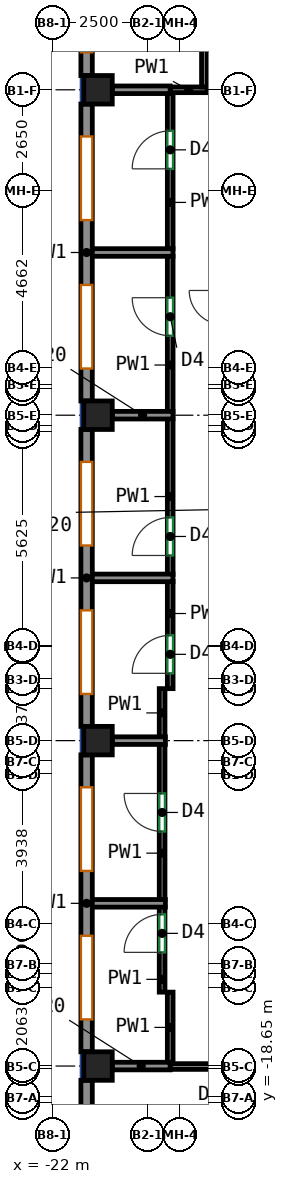
"""IFC4 building model, lengths in metres.
Left out: names, types, materials, properties, quantities, classifications, styles, units other than length and angle.
Written with IfcOpenShell. Run it as: python <this file> out.ifc"""

import sys

from ifc_helpers import new_model, si_unit, direction, frame, frame_2d, origin, origin_2d, place, context, subcontext, project, spatial, rectangle, extrude, source, transform, mapped, element, fill, save


model = new_model("IFC4")
c1 = context("Model", 3, precision=1e-05, world=origin(), true_north=direction((0.0, 1.0)))
c2 = subcontext(c1, "Body", "Model", "MODEL_VIEW")
j1 = project(units=[si_unit("LENGTHUNIT", "METRE"), si_unit("PLANEANGLEUNIT", "RADIAN")], contexts=[c1])
p1 = place(None, origin())
s1 = spatial("IfcSite", under=j1, at=p1, CompositionType="ELEMENT")
p2 = place(p1, origin())
s2 = spatial("IfcBuilding", under=s1, at=p2, CompositionType="ELEMENT")
p3 = place(p2, frame((0.0, 0.0, 203.3)))
s3 = spatial("IfcBuildingStorey", under=s2, at=p3, CompositionType="ELEMENT", Elevation=203.3)
m1 = source(origin(), c2, "Body", "SweptSolid", [
    extrude(rectangle(XDim=0.75, YDim=0.75, at=origin_2d()), origin(), (0.0, 0.0, 1.0), 3.12),
])
for number, where, z_axis, x_axis in (
    (1, (-20.8, -17.688, 0.0), (0.0, 0.0, 1.0), (1.0, 0.0, 0.0)),
    (2, (-20.8, -9.125, 0.0), (0.0, 0.0, 1.0), (1.0, 0.0, 0.0)),
    (3, (-20.8, -0.562, 0.0), (0.0, 0.0, 1.0), (1.0, 0.0, 0.0)),
    (4, (-20.8, 8.0, 0.0), (0.0, 0.0, 1.0), (1.0, 0.0, 0.0)),
):
    element("IfcColumn", number, at=place(p3, frame(where, z_axis=z_axis, x_axis=x_axis)), inside=s3, PredefinedType="COLUMN", context=c2, shape_type="MappedRepresentation", body=[
        mapped(m1, transform((0.0, 0.0, 0.0))),
    ])
m2 = source(origin(), c2, "Body", "SweptSolid", [
    extrude(rectangle(XDim=13.682, YDim=0.3, at=frame_2d((6.841, 0.0))), origin(), (0.0, 0.0, 1.0), 3.12),
])
p4 = place(p3, frame((-21.1, 22.057, 0.0), z_axis=(0.0, 0.0, 1.0), x_axis=(0.0, -1.0, 0.0)))
e5 = element("IfcWall", 5, at=p4, inside=s3, PredefinedType="SOLIDWALL", context=c2, shape_type="MappedRepresentation", body=[
    mapped(m2, transform((0.0, 0.0, 0.0))),
])
p5 = place(p4, frame((0.61, 0.0, 0.85)))
e6 = element("IfcOpeningElement", 6, at=p5, cuts=e5, PredefinedType="OPENING", context=c2, shape_type="SweptSolid", body=[
    extrude(rectangle(XDim=2.2, YDim=1.95, at=frame_2d((1.1, 0.975))), frame((0.0, 0.16, 0.0), z_axis=(0.0, -1.0, 0.0), x_axis=(1.0, 0.0, 0.0)), (0.0, 0.0, 1.0), 0.32),
])
p6 = place(p4, frame((4.031, 0.0, 0.85)))
e7 = element("IfcOpeningElement", 7, at=p6, cuts=e5, PredefinedType="OPENING", context=c2, shape_type="SweptSolid", body=[
    extrude(rectangle(XDim=2.2, YDim=1.95, at=frame_2d((1.1, 0.975))), frame((0.0, 0.16, 0.0), z_axis=(0.0, -1.0, 0.0), x_axis=(1.0, 0.0, 0.0)), (0.0, 0.0, 1.0), 0.32),
])
p7 = place(p4, frame((7.451, 0.0, 0.85)))
e8 = element("IfcOpeningElement", 8, at=p7, cuts=e5, PredefinedType="OPENING", context=c2, shape_type="SweptSolid", body=[
    extrude(rectangle(XDim=2.2, YDim=1.95, at=frame_2d((1.1, 0.975))), frame((0.0, 0.16, 0.0), z_axis=(0.0, -1.0, 0.0), x_axis=(1.0, 0.0, 0.0)), (0.0, 0.0, 1.0), 0.32),
])
p8 = place(p4, frame((10.872, 0.0, 0.85)))
e9 = element("IfcOpeningElement", 9, at=p8, cuts=e5, PredefinedType="OPENING", context=c2, shape_type="SweptSolid", body=[
    extrude(rectangle(XDim=2.2, YDim=1.95, at=frame_2d((1.1, 0.975))), frame((0.0, 0.16, 0.0), z_axis=(0.0, -1.0, 0.0), x_axis=(1.0, 0.0, 0.0)), (0.0, 0.0, 1.0), 0.32),
])
m3 = source(origin(), c2, "Body", "SweptSolid", [
    extrude(rectangle(XDim=7.812, YDim=0.3, at=frame_2d((3.906, 0.0))), origin(), (0.0, 0.0, 1.0), 3.12),
])
p9 = place(p3, frame((-21.1, 7.625, 0.0), z_axis=(0.0, 0.0, 1.0), x_axis=(0.0, -1.0, 0.0)))
e10 = element("IfcWall", 10, at=p9, inside=s3, PredefinedType="SOLIDWALL", context=c2, shape_type="MappedRepresentation", body=[
    mapped(m3, transform((0.0, 0.0, 0.0))),
])
p10 = place(p9, frame((0.853, 0.0, 0.85)))
e11 = element("IfcOpeningElement", 11, at=p10, cuts=e10, PredefinedType="OPENING", context=c2, shape_type="SweptSolid", body=[
    extrude(rectangle(XDim=2.2, YDim=1.95, at=frame_2d((1.1, 0.975))), frame((0.0, 0.16, 0.0), z_axis=(0.0, -1.0, 0.0), x_axis=(1.0, 0.0, 0.0)), (0.0, 0.0, 1.0), 0.32),
])
p11 = place(p9, frame((4.759, 0.0, 0.85)))
e12 = element("IfcOpeningElement", 12, at=p11, cuts=e10, PredefinedType="OPENING", context=c2, shape_type="SweptSolid", body=[
    extrude(rectangle(XDim=2.2, YDim=1.95, at=frame_2d((1.1, 0.975))), frame((0.0, 0.16, 0.0), z_axis=(0.0, -1.0, 0.0), x_axis=(1.0, 0.0, 0.0)), (0.0, 0.0, 1.0), 0.32),
])
p12 = place(p3, frame((-21.1, -0.938, 0.0), z_axis=(0.0, 0.0, 1.0), x_axis=(0.0, -1.0, 0.0)))
e13 = element("IfcWall", 13, at=p12, inside=s3, PredefinedType="SOLIDWALL", context=c2, shape_type="MappedRepresentation", body=[
    mapped(m3, transform((0.0, 0.0, 0.0))),
])
p13 = place(p12, frame((0.853, 0.0, 0.85)))
e14 = element("IfcOpeningElement", 14, at=p13, cuts=e13, PredefinedType="OPENING", context=c2, shape_type="SweptSolid", body=[
    extrude(rectangle(XDim=2.2, YDim=1.95, at=frame_2d((1.1, 0.975))), frame((0.0, 0.16, 0.0), z_axis=(0.0, -1.0, 0.0), x_axis=(1.0, 0.0, 0.0)), (0.0, 0.0, 1.0), 0.32),
])
p14 = place(p12, frame((4.76, 0.0, 0.85)))
e15 = element("IfcOpeningElement", 15, at=p14, cuts=e13, PredefinedType="OPENING", context=c2, shape_type="SweptSolid", body=[
    extrude(rectangle(XDim=2.2, YDim=1.95, at=frame_2d((1.1, 0.975))), frame((0.0, 0.16, 0.0), z_axis=(0.0, -1.0, 0.0), x_axis=(1.0, 0.0, 0.0)), (0.0, 0.0, 1.0), 0.32),
])
p15 = place(p3, frame((-21.1, -9.5, 0.0), z_axis=(0.0, 0.0, 1.0), x_axis=(0.0, -1.0, 0.0)))
e16 = element("IfcWall", 16, at=p15, inside=s3, PredefinedType="SOLIDWALL", context=c2, shape_type="MappedRepresentation", body=[
    mapped(m3, transform((0.0, 0.0, 0.0))),
])
p16 = place(p15, frame((0.853, 0.0, 0.85)))
e17 = element("IfcOpeningElement", 17, at=p16, cuts=e16, PredefinedType="OPENING", context=c2, shape_type="SweptSolid", body=[
    extrude(rectangle(XDim=2.2, YDim=1.95, at=frame_2d((1.1, 0.975))), frame((0.0, 0.16, 0.0), z_axis=(0.0, -1.0, 0.0), x_axis=(1.0, 0.0, 0.0)), (0.0, 0.0, 1.0), 0.32),
])
p17 = place(p15, frame((4.759, 0.0, 0.85)))
e18 = element("IfcOpeningElement", 18, at=p17, cuts=e16, PredefinedType="OPENING", context=c2, shape_type="SweptSolid", body=[
    extrude(rectangle(XDim=2.2, YDim=1.95, at=frame_2d((1.1, 0.975))), frame((0.0, 0.16, 0.0), z_axis=(0.0, -1.0, 0.0), x_axis=(1.0, 0.0, 0.0)), (0.0, 0.0, 1.0), 0.32),
])
m4 = source(origin(), c2, "Body", "SweptSolid", [
    extrude(rectangle(XDim=4.312, YDim=0.3, at=frame_2d((2.156, 0.0))), origin(), (0.0, 0.0, 1.0), 3.12),
])
p18 = place(p3, frame((-21.1, -18.062, 0.0), z_axis=(0.0, 0.0, 1.0), x_axis=(0.0, -1.0, 0.0)))
e19 = element("IfcWall", 19, at=p18, inside=s3, PredefinedType="SOLIDWALL", context=c2, shape_type="MappedRepresentation", body=[
    mapped(m4, transform((0.0, 0.0, 0.0))),
])
p19 = place(p18, frame((1.056, 0.0, 0.85)))
e20 = element("IfcOpeningElement", 20, at=p19, cuts=e19, PredefinedType="OPENING", context=c2, shape_type="SweptSolid", body=[
    extrude(rectangle(XDim=2.2, YDim=1.95, at=frame_2d((1.1, 0.975))), frame((0.0, 0.16, 0.0), z_axis=(0.0, -1.0, 0.0), x_axis=(1.0, 0.0, 0.0)), (0.0, 0.0, 1.0), 0.32),
])
p20 = place(p3, frame((-18.9, -17.7, 0.0), z_axis=(0.0, 0.0, 1.0), x_axis=(1.0, 0.0, 0.0)))
e21 = element("IfcWall", 21, at=p20, inside=s3, PredefinedType="PARTITIONING", context=c2, shape_type="SweptSolid", body=[
    extrude(rectangle(XDim=8.233, YDim=0.15, at=frame_2d((4.116, 0.0))), origin(), (0.0, 0.0, 1.0), 2.52),
])
p21 = place(p20, frame((1.135, 0.0, 0.0)))
e22 = element("IfcOpeningElement", 22, at=p21, cuts=e21, PredefinedType="OPENING", context=c2, shape_type="SweptSolid", body=[
    extrude(rectangle(XDim=1.0, YDim=2.1, at=frame_2d((0.5, 1.05))), frame((0.0, 0.085, 0.0), z_axis=(0.0, -1.0, 0.0), x_axis=(1.0, 0.0, 0.0)), (0.0, 0.0, 1.0), 0.17),
])
p22 = place(p20, frame((5.131, 0.0, 0.0)))
e23 = element("IfcOpeningElement", 23, at=p22, cuts=e21, PredefinedType="OPENING", context=c2, shape_type="SweptSolid", body=[
    extrude(rectangle(XDim=1.0, YDim=2.1, at=frame_2d((0.5, 1.05))), frame((0.0, 0.085, 0.0), z_axis=(0.0, -1.0, 0.0), x_axis=(1.0, 0.0, 0.0)), (0.0, 0.0, 1.0), 0.17),
])
p23 = place(p3, frame((-17.925, 8.0, 0.0), z_axis=(0.0, 0.0, 1.0), x_axis=(-1.0, 0.0, 0.0)))
e24 = element("IfcWall", 24, at=p23, inside=s3, PredefinedType="PARTITIONING", context=c2, shape_type="SweptSolid", body=[
    extrude(rectangle(XDim=0.976, YDim=0.15, at=frame_2d((0.488, 0.0))), origin(), (0.0, 0.0, 1.0), 3.12),
])
p24 = place(p3, frame((-18.0, 21.9, 0.0), z_axis=(0.0, 0.0, 1.0), x_axis=(0.0, -1.0, 0.0)))
e25 = element("IfcWall", 25, at=p24, inside=s3, PredefinedType="PARTITIONING", context=c2, shape_type="SweptSolid", body=[
    extrude(rectangle(XDim=13.825, YDim=0.15, at=frame_2d((6.913, 0.0))), origin(), (0.0, 0.0, 1.0), 3.12),
])
p25 = place(p24, frame((10.721, 0.0, 0.0)))
e26 = element("IfcOpeningElement", 26, at=p25, cuts=e25, PredefinedType="OPENING", context=c2, shape_type="SweptSolid", body=[
    extrude(rectangle(XDim=1.0, YDim=2.1, at=frame_2d((0.5, 1.05))), frame((0.0, 0.085, 0.0), z_axis=(0.0, -1.0, 0.0), x_axis=(1.0, 0.0, 0.0)), (0.0, 0.0, 1.0), 0.17),
])
p26 = place(p3, frame((-18.9, -17.598, 0.0), z_axis=(0.0, 0.0, 1.0), x_axis=(0.0, 1.0, 0.0)))
e27 = element("IfcWall", 27, at=p26, inside=s3, PredefinedType="PARTITIONING", context=c2, shape_type="SweptSolid", body=[
    extrude(rectangle(XDim=1.855, YDim=0.15, at=frame_2d((0.927, 0.0))), origin(), (0.0, 0.0, 1.0), 3.12),
])
p27 = place(p3, frame((-19.113, -15.743, 0.0), z_axis=(0.0, 0.0, 1.0), x_axis=(0.0, 1.0, 0.0)))
e28 = element("IfcWall", 28, at=p27, inside=s3, PredefinedType="PARTITIONING", context=c2, shape_type="SweptSolid", body=[
    extrude(rectangle(XDim=2.247, YDim=0.15, at=frame_2d((1.124, 0.0))), origin(), (0.0, 0.0, 1.0), 3.12),
])
p28 = place(p27, frame((1.047, 0.0, 0.0)))
e29 = element("IfcOpeningElement", 29, at=p28, cuts=e28, PredefinedType="OPENING", context=c2, shape_type="SweptSolid", body=[
    extrude(rectangle(XDim=1.0, YDim=2.1, at=frame_2d((0.5, 1.05))), frame((0.0, 0.085, 0.0), z_axis=(0.0, -1.0, 0.0), x_axis=(1.0, 0.0, 0.0)), (0.0, 0.0, 1.0), 0.17),
])
p29 = place(p3, frame((-19.113, -13.316, 0.0), z_axis=(0.0, 0.0, 1.0), x_axis=(0.0, 1.0, 0.0)))
e30 = element("IfcWall", 30, at=p29, inside=s3, PredefinedType="PARTITIONING", context=c2, shape_type="SweptSolid", body=[
    extrude(rectangle(XDim=4.101, YDim=0.15, at=frame_2d((2.05, 0.0))), origin(), (0.0, 0.0, 1.0), 3.12),
])
p30 = place(p29, frame((1.801, 0.0, 0.0)))
e31 = element("IfcOpeningElement", 31, at=p30, cuts=e30, PredefinedType="OPENING", context=c2, shape_type="SweptSolid", body=[
    extrude(rectangle(XDim=1.0, YDim=2.1, at=frame_2d((0.5, 1.05))), frame((0.0, 0.085, 0.0), z_axis=(0.0, -1.0, 0.0), x_axis=(1.0, 0.0, 0.0)), (0.0, 0.0, 1.0), 0.17),
])
p31 = place(p3, frame((-18.9, -7.757, 0.0), z_axis=(0.0, 0.0, 1.0), x_axis=(0.0, 1.0, 0.0)))
e32 = element("IfcWall", 32, at=p31, inside=s3, PredefinedType="PARTITIONING", context=c2, shape_type="SweptSolid", body=[
    extrude(rectangle(XDim=2.824, YDim=0.15, at=frame_2d((1.412, 0.0))), origin(), (0.0, 0.0, 1.0), 3.12),
])
p32 = place(p31, frame((0.403, 0.0, 0.0)))
e33 = element("IfcOpeningElement", 33, at=p32, cuts=e32, PredefinedType="OPENING", context=c2, shape_type="SweptSolid", body=[
    extrude(rectangle(XDim=1.0, YDim=2.1, at=frame_2d((0.5, 1.05))), frame((0.0, 0.085, 0.0), z_axis=(0.0, -1.0, 0.0), x_axis=(1.0, 0.0, 0.0)), (0.0, 0.0, 1.0), 0.17),
])
p33 = place(p3, frame((-19.113, -9.035, 0.0), z_axis=(0.0, 0.0, 1.0), x_axis=(0.0, 1.0, 0.0)))
e34 = element("IfcWall", 34, at=p33, inside=s3, PredefinedType="PARTITIONING", context=c2, shape_type="SweptSolid", body=[
    extrude(rectangle(XDim=1.278, YDim=0.15, at=frame_2d((0.639, 0.0))), origin(), (0.0, 0.0, 1.0), 3.12),
])
p34 = place(p3, frame((-18.9, -4.753, 0.0), z_axis=(0.0, 0.0, 1.0), x_axis=(0.0, 1.0, 0.0)))
e35 = element("IfcWall", 35, at=p34, inside=s3, PredefinedType="PARTITIONING", context=c2, shape_type="SweptSolid", body=[
    extrude(rectangle(XDim=4.101, YDim=0.15, at=frame_2d((2.05, 0.0))), origin(), (0.0, 0.0, 1.0), 3.12),
])
p35 = place(p34, frame((0.5, 0.0, 0.0)))
e36 = element("IfcOpeningElement", 36, at=p35, cuts=e35, PredefinedType="OPENING", context=c2, shape_type="SweptSolid", body=[
    extrude(rectangle(XDim=1.0, YDim=2.1, at=frame_2d((0.5, 1.05))), frame((0.0, 0.085, 0.0), z_axis=(0.0, -1.0, 0.0), x_axis=(1.0, 0.0, 0.0)), (0.0, 0.0, 1.0), 0.17),
])
p36 = place(p3, frame((-18.9, -0.472, 0.0), z_axis=(0.0, 0.0, 1.0), x_axis=(0.0, 1.0, 0.0)))
e37 = element("IfcWall", 37, at=p36, inside=s3, PredefinedType="PARTITIONING", context=c2, shape_type="SweptSolid", body=[
    extrude(rectangle(XDim=4.101, YDim=0.15, at=frame_2d((2.05, 0.0))), origin(), (0.0, 0.0, 1.0), 3.12),
])
p37 = place(p36, frame((2.001, 0.0, 0.0)))
e38 = element("IfcOpeningElement", 38, at=p37, cuts=e37, PredefinedType="OPENING", context=c2, shape_type="SweptSolid", body=[
    extrude(rectangle(XDim=1.0, YDim=2.1, at=frame_2d((0.5, 1.05))), frame((0.0, 0.085, 0.0), z_axis=(0.0, -1.0, 0.0), x_axis=(1.0, 0.0, 0.0)), (0.0, 0.0, 1.0), 0.17),
])
p38 = place(p3, frame((-18.9, 3.809, 0.0), z_axis=(0.0, 0.0, 1.0), x_axis=(0.0, 1.0, 0.0)))
e39 = element("IfcWall", 39, at=p38, inside=s3, PredefinedType="PARTITIONING", context=c2, shape_type="SweptSolid", body=[
    extrude(rectangle(XDim=4.092, YDim=0.15, at=frame_2d((2.046, 0.0))), origin(), (0.0, 0.0, 1.0), 3.12),
])
p39 = place(p38, frame((2.111, 0.0, 0.0)))
e40 = element("IfcOpeningElement", 40, at=p39, cuts=e39, PredefinedType="OPENING", context=c2, shape_type="SweptSolid", body=[
    extrude(rectangle(XDim=1.0, YDim=2.1, at=frame_2d((0.5, 1.05))), frame((0.0, 0.085, 0.0), z_axis=(0.0, -1.0, 0.0), x_axis=(1.0, 0.0, 0.0)), (0.0, 0.0, 1.0), 0.17),
])
p40 = place(p3, frame((-20.425, -17.688, 0.0), z_axis=(0.0, 0.0, 1.0), x_axis=(1.0, 0.0, 0.0)))
e41 = element("IfcWall", 41, at=p40, inside=s3, PredefinedType="PARTITIONING", context=c2, shape_type="SweptSolid", body=[
    extrude(rectangle(XDim=1.523, YDim=0.2, at=frame_2d((0.761, 0.0))), origin(), (0.0, 0.0, 1.0), 2.52),
])
p41 = place(p3, frame((-20.425, 8.0, 0.0), z_axis=(0.0, 0.0, 1.0), x_axis=(0.999999794741, 0.000640717472, 0.0)))
e42 = element("IfcWall", 42, at=p41, inside=s3, PredefinedType="PARTITIONING", context=c2, shape_type="SweptSolid", body=[
    extrude(rectangle(XDim=1.524, YDim=0.2, at=frame_2d((0.762, 0.0))), origin(), (0.0, 0.0, 1.0), 3.12),
])
p42 = place(p3, frame((-19.027, -13.406, 0.0), z_axis=(0.0, 0.0, 1.0), x_axis=(-1.0, 0.0, 0.0)))
e43 = element("IfcWall", 43, at=p42, inside=s3, PredefinedType="PARTITIONING", context=c2, shape_type="SweptSolid", body=[
    extrude(rectangle(XDim=1.973, YDim=0.2, at=frame_2d((0.986, 0.0))), origin(), (0.0, 0.0, 1.0), 3.12),
])
p43 = place(p3, frame((-20.425, -9.125, 0.0), z_axis=(0.0, 0.0, 1.0), x_axis=(1.0, 0.0, 0.0)))
e44 = element("IfcWall", 44, at=p43, inside=s3, PredefinedType="PARTITIONING", context=c2, shape_type="SweptSolid", body=[
    extrude(rectangle(XDim=1.398, YDim=0.2, at=frame_2d((0.699, 0.0))), origin(), (0.0, 0.0, 1.0), 3.12),
])
p44 = place(p3, frame((-21.0, -4.843, 0.0), z_axis=(0.0, 0.0, 1.0), x_axis=(1.0, 0.0, 0.0)))
e45 = element("IfcWall", 45, at=p44, inside=s3, PredefinedType="PARTITIONING", context=c2, shape_type="SweptSolid", body=[
    extrude(rectangle(XDim=2.173, YDim=0.2, at=frame_2d((1.086, 0.0))), origin(), (0.0, 0.0, 1.0), 3.12),
])
p45 = place(p3, frame((-18.827, -0.562, 0.0), z_axis=(0.0, 0.0, 1.0), x_axis=(-1.0, 0.0, 0.0)))
e46 = element("IfcWall", 46, at=p45, inside=s3, PredefinedType="PARTITIONING", context=c2, shape_type="SweptSolid", body=[
    extrude(rectangle(XDim=1.598, YDim=0.2, at=frame_2d((0.799, 0.0))), origin(), (0.0, 0.0, 1.0), 2.52),
])
p46 = place(p3, frame((-21.0, 3.719, 0.0), z_axis=(0.0, 0.0, 1.0), x_axis=(1.0, 0.0, 0.0)))
e47 = element("IfcWall", 47, at=p46, inside=s3, PredefinedType="PARTITIONING", context=c2, shape_type="SweptSolid", body=[
    extrude(rectangle(XDim=2.173, YDim=0.2, at=frame_2d((1.086, 0.0))), origin(), (0.0, 0.0, 1.0), 3.12),
])
p47 = place(p8, origin())
e48 = element("IfcWindow", 48, at=p47, inside=s3, PartitioningType="SINGLE_PANEL", PredefinedType="WINDOW", context=c2, shape_type="SweptSolid", body=[
    extrude(rectangle(XDim=2.2, YDim=1.95, at=frame_2d((1.1, 0.975))), frame((0.0, 0.03, 0.0), z_axis=(0.0, -1.0, 0.0), x_axis=(1.0, 0.0, 0.0)), (0.0, 0.0, 1.0), 0.06),
])
fill(e9, e48)
p48 = place(p10, origin())
e49 = element("IfcWindow", 49, at=p48, inside=s3, PartitioningType="SINGLE_PANEL", PredefinedType="WINDOW", context=c2, shape_type="SweptSolid", body=[
    extrude(rectangle(XDim=2.2, YDim=1.95, at=frame_2d((1.1, 0.975))), frame((0.0, 0.03, 0.0), z_axis=(0.0, -1.0, 0.0), x_axis=(1.0, 0.0, 0.0)), (0.0, 0.0, 1.0), 0.06),
])
fill(e11, e49)
p49 = place(p11, origin())
e50 = element("IfcWindow", 50, at=p49, inside=s3, PartitioningType="SINGLE_PANEL", PredefinedType="WINDOW", context=c2, shape_type="SweptSolid", body=[
    extrude(rectangle(XDim=2.2, YDim=1.95, at=frame_2d((1.1, 0.975))), frame((0.0, 0.03, 0.0), z_axis=(0.0, -1.0, 0.0), x_axis=(1.0, 0.0, 0.0)), (0.0, 0.0, 1.0), 0.06),
])
fill(e12, e50)
p50 = place(p13, origin())
e51 = element("IfcWindow", 51, at=p50, inside=s3, PartitioningType="SINGLE_PANEL", PredefinedType="WINDOW", context=c2, shape_type="SweptSolid", body=[
    extrude(rectangle(XDim=2.2, YDim=1.95, at=frame_2d((1.1, 0.975))), frame((0.0, 0.03, 0.0), z_axis=(0.0, -1.0, 0.0), x_axis=(1.0, 0.0, 0.0)), (0.0, 0.0, 1.0), 0.06),
])
fill(e14, e51)
p51 = place(p14, origin())
e52 = element("IfcWindow", 52, at=p51, inside=s3, PartitioningType="SINGLE_PANEL", PredefinedType="WINDOW", context=c2, shape_type="SweptSolid", body=[
    extrude(rectangle(XDim=2.2, YDim=1.95, at=frame_2d((1.1, 0.975))), frame((0.0, 0.03, 0.0), z_axis=(0.0, -1.0, 0.0), x_axis=(1.0, 0.0, 0.0)), (0.0, 0.0, 1.0), 0.06),
])
fill(e15, e52)
p52 = place(p16, origin())
e53 = element("IfcWindow", 53, at=p52, inside=s3, PartitioningType="SINGLE_PANEL", PredefinedType="WINDOW", context=c2, shape_type="SweptSolid", body=[
    extrude(rectangle(XDim=2.2, YDim=1.95, at=frame_2d((1.1, 0.975))), frame((0.0, 0.03, 0.0), z_axis=(0.0, -1.0, 0.0), x_axis=(1.0, 0.0, 0.0)), (0.0, 0.0, 1.0), 0.06),
])
fill(e17, e53)
p53 = place(p17, origin())
e54 = element("IfcWindow", 54, at=p53, inside=s3, PartitioningType="SINGLE_PANEL", PredefinedType="WINDOW", context=c2, shape_type="SweptSolid", body=[
    extrude(rectangle(XDim=2.2, YDim=1.95, at=frame_2d((1.1, 0.975))), frame((0.0, 0.03, 0.0), z_axis=(0.0, -1.0, 0.0), x_axis=(1.0, 0.0, 0.0)), (0.0, 0.0, 1.0), 0.06),
])
fill(e18, e54)
p54 = place(p28, origin())
e55 = element("IfcDoor", 55, at=p54, inside=s3, OperationType="SINGLE_SWING_LEFT", PredefinedType="DOOR", context=c2, shape_type="SweptSolid", body=[
    extrude(rectangle(XDim=1.0, YDim=2.1, at=frame_2d((0.5, 1.05))), frame((0.0, 0.025, 0.0), z_axis=(0.0, -1.0, 0.0), x_axis=(1.0, 0.0, 0.0)), (0.0, 0.0, 1.0), 0.05),
])
fill(e29, e55)
p55 = place(p30, origin())
e56 = element("IfcDoor", 56, at=p55, inside=s3, OperationType="SINGLE_SWING_RIGHT", PredefinedType="DOOR", context=c2, shape_type="SweptSolid", body=[
    extrude(rectangle(XDim=1.0, YDim=2.1, at=frame_2d((0.5, 1.05))), frame((0.0, 0.025, 0.0), z_axis=(0.0, -1.0, 0.0), x_axis=(1.0, 0.0, 0.0)), (0.0, 0.0, 1.0), 0.05),
])
fill(e31, e56)
p56 = place(p32, origin())
e57 = element("IfcDoor", 57, at=p56, inside=s3, OperationType="SINGLE_SWING_LEFT", PredefinedType="DOOR", context=c2, shape_type="SweptSolid", body=[
    extrude(rectangle(XDim=1.0, YDim=2.1, at=frame_2d((0.5, 1.05))), frame((0.0, 0.025, 0.0), z_axis=(0.0, -1.0, 0.0), x_axis=(1.0, 0.0, 0.0)), (0.0, 0.0, 1.0), 0.05),
])
fill(e33, e57)
p57 = place(p35, origin())
e58 = element("IfcDoor", 58, at=p57, inside=s3, OperationType="SINGLE_SWING_LEFT", PredefinedType="DOOR", context=c2, shape_type="SweptSolid", body=[
    extrude(rectangle(XDim=1.0, YDim=2.1, at=frame_2d((0.5, 1.05))), frame((0.0, 0.025, 0.0), z_axis=(0.0, -1.0, 0.0), x_axis=(1.0, 0.0, 0.0)), (0.0, 0.0, 1.0), 0.05),
])
fill(e36, e58)
p58 = place(p37, origin())
e59 = element("IfcDoor", 59, at=p58, inside=s3, OperationType="SINGLE_SWING_RIGHT", PredefinedType="DOOR", context=c2, shape_type="SweptSolid", body=[
    extrude(rectangle(XDim=1.0, YDim=2.1, at=frame_2d((0.5, 1.05))), frame((0.0, 0.025, 0.0), z_axis=(0.0, -1.0, 0.0), x_axis=(1.0, 0.0, 0.0)), (0.0, 0.0, 1.0), 0.05),
])
fill(e38, e59)
p59 = place(p39, origin())
e60 = element("IfcDoor", 60, at=p59, inside=s3, OperationType="SINGLE_SWING_LEFT", PredefinedType="DOOR", context=c2, shape_type="SweptSolid", body=[
    extrude(rectangle(XDim=1.0, YDim=2.1, at=frame_2d((0.5, 1.05))), frame((0.0, 0.025, 0.0), z_axis=(0.0, -1.0, 0.0), x_axis=(1.0, 0.0, 0.0)), (0.0, 0.0, 1.0), 0.05),
])
fill(e40, e60)
save(model, sys.argv[1])
